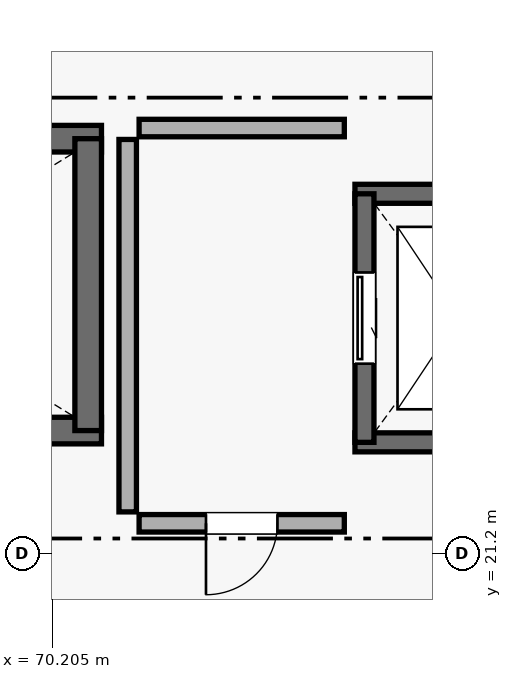
"""IFC4 building model, lengths in metres.
Left out: names, types, materials, properties, quantities, classifications, styles, units other than length and angle.
Written with IfcOpenShell. Run it as: python <this file> out.ifc"""

import sys

from ifc_helpers import new_model, si_unit, direction, frame, frame_2d, origin, place, context, subcontext, project, spatial, rectangle, extrude, element, fill, save


model = new_model("IFC4")
c1 = context("Model", 3, precision=1e-05, world=origin(), true_north=direction((0.0, 1.0)))
c2 = subcontext(c1, "Body", "Model", "MODEL_VIEW")
j1 = project(units=[si_unit("LENGTHUNIT", "METRE"), si_unit("PLANEANGLEUNIT", "RADIAN")], contexts=[c1])
p1 = place(None, origin())
s1 = spatial("IfcSite", under=j1, at=p1, CompositionType="ELEMENT")
p2 = place(p1, origin())
s2 = spatial("IfcBuilding", under=s1, at=p2, CompositionType="ELEMENT")
p3 = place(p2, frame((0.0, 0.0, 28.8)))
s3 = spatial("IfcBuildingStorey", under=s2, at=p3, CompositionType="ELEMENT", Elevation=28.8)
for number, where, z_axis, x_axis in (
    (1, (70.855, 22.82, 0.0), (0.0, 0.0, 1.0), (-1.0, 0.0, 0.0)),
    (2, (62.845, 26.66, 0.0), (0.0, 0.0, 1.0), (1.0, 0.0, 0.0)),
):
    element("IfcWall", number, at=place(p3, frame(where, z_axis=z_axis, x_axis=x_axis)), inside=s3, PredefinedType="SHEAR", context=c2, shape_type="SweptSolid", body=[
        extrude(rectangle(XDim=8.01, YDim=0.35, at=frame_2d((4.005, 0.0))), origin(), (0.0, 0.0, 1.0), 4.23),
    ])
p4 = place(p3, frame((70.68, 26.66, 0.0), z_axis=(0.0, 0.0, 1.0), x_axis=(0.0, -1.0, 0.0)))
e3 = element("IfcWall", 3, at=p4, inside=s3, PredefinedType="SHEAR", context=c2, shape_type="SweptSolid", body=[
    extrude(rectangle(XDim=3.84, YDim=0.35, at=frame_2d((1.92, 0.0))), origin(), (0.0, 0.0, 1.0), 4.23),
])
for number, where, z_axis, x_axis in (
    (4, (76.91, 22.665, 0.0), (0.0, 0.0, 1.0), (-1.0, 0.0, 0.0)),
    (5, (74.19, 25.935, 0.0), (0.0, 0.0, 1.0), (1.0, 0.0, 0.0)),
):
    element("IfcWall", number, at=place(p3, frame(where, z_axis=z_axis, x_axis=x_axis)), inside=s3, PredefinedType="SHEAR", context=c2, shape_type="SweptSolid", body=[
        extrude(rectangle(XDim=2.72, YDim=0.25, at=frame_2d((1.36, 0.0))), origin(), (0.0, 0.0, 1.0), 4.23),
    ])
p5 = place(p3, frame((74.315, 22.665, 0.0), z_axis=(0.0, 0.0, 1.0), x_axis=(0.0, 1.0, 0.0)))
e6 = element("IfcWall", 6, at=p5, inside=s3, PredefinedType="SHEAR", context=c2, shape_type="SweptSolid", body=[
    extrude(rectangle(XDim=3.27, YDim=0.25, at=frame_2d((1.635, 0.0))), origin(), (0.0, 0.0, 1.0), 4.23),
])
p6 = place(p5, frame((1.035, 0.0, 0.0)))
e7 = element("IfcOpeningElement", 7, at=p6, cuts=e6, PredefinedType="OPENING", context=c2, shape_type="SweptSolid", body=[
    extrude(rectangle(XDim=1.2, YDim=2.25, at=frame_2d((0.6, 1.125))), frame((0.0, 0.135, 0.0), z_axis=(0.0, -1.0, 0.0), x_axis=(1.0, 0.0, 0.0)), (0.0, 0.0, 1.0), 0.27),
])
p7 = place(p3, frame((74.05, 21.6, 0.0), z_axis=(0.0, 0.0, 1.0), x_axis=(-1.0, 0.0, 0.0)))
e8 = element("IfcWall", 8, at=p7, inside=s3, PredefinedType="PARTITIONING", context=c2, shape_type="SweptSolid", body=[
    extrude(rectangle(XDim=2.7, YDim=0.23, at=frame_2d((1.35, 0.0))), origin(), (0.0, 0.0, 1.0), 2.98),
])
p8 = place(p7, frame((0.88, 0.0, 0.0)))
e9 = element("IfcOpeningElement", 9, at=p8, cuts=e8, PredefinedType="OPENING", context=c2, shape_type="SweptSolid", body=[
    extrude(rectangle(XDim=0.94, YDim=2.06, at=frame_2d((0.47, 1.03))), frame((0.0, 0.125, 0.0), z_axis=(0.0, -1.0, 0.0), x_axis=(1.0, 0.0, 0.0)), (0.0, 0.0, 1.0), 0.25),
])
p9 = place(p3, frame((71.35, 26.8, 0.0), z_axis=(0.0, 0.0, 1.0), x_axis=(1.0, 0.0, 0.0)))
e10 = element("IfcWall", 10, at=p9, inside=s3, PredefinedType="PARTITIONING", context=c2, shape_type="SweptSolid", body=[
    extrude(rectangle(XDim=2.7, YDim=0.23, at=frame_2d((1.35, 0.0))), origin(), (0.0, 0.0, 1.0), 2.98),
])
p10 = place(p3, frame((71.2, 21.75, 0.0), z_axis=(0.0, 0.0, 1.0), x_axis=(0.0, 1.0, 0.0)))
e11 = element("IfcWall", 11, at=p10, inside=s3, PredefinedType="PARTITIONING", context=c2, shape_type="SweptSolid", body=[
    extrude(rectangle(XDim=4.9, YDim=0.23, at=frame_2d((2.45, 0.0))), origin(), (0.0, 0.0, 1.0), 2.98),
])
p11 = place(p6, origin())
e12 = element("IfcDoor", 12, at=p11, inside=s3, OperationType="SLIDING_TO_LEFT", PredefinedType="DOOR", context=c2, shape_type="SweptSolid", body=[
    extrude(rectangle(XDim=1.2, YDim=2.25, at=frame_2d((0.6, 1.125))), frame((0.0, 0.025, 0.0), z_axis=(0.0, -1.0, 0.0), x_axis=(1.0, 0.0, 0.0)), (0.0, 0.0, 1.0), 0.05),
])
fill(e7, e12)
p12 = place(p8, origin())
e13 = element("IfcDoor", 13, at=p12, inside=s3, OperationType="SINGLE_SWING_RIGHT", PredefinedType="DOOR", context=c2, shape_type="SweptSolid", body=[
    extrude(rectangle(XDim=0.94, YDim=2.06, at=frame_2d((0.47, 1.03))), frame((0.0, 0.025, 0.0), z_axis=(0.0, -1.0, 0.0), x_axis=(1.0, 0.0, 0.0)), (0.0, 0.0, 1.0), 0.05),
])
fill(e9, e13)
save(model, sys.argv[1])
